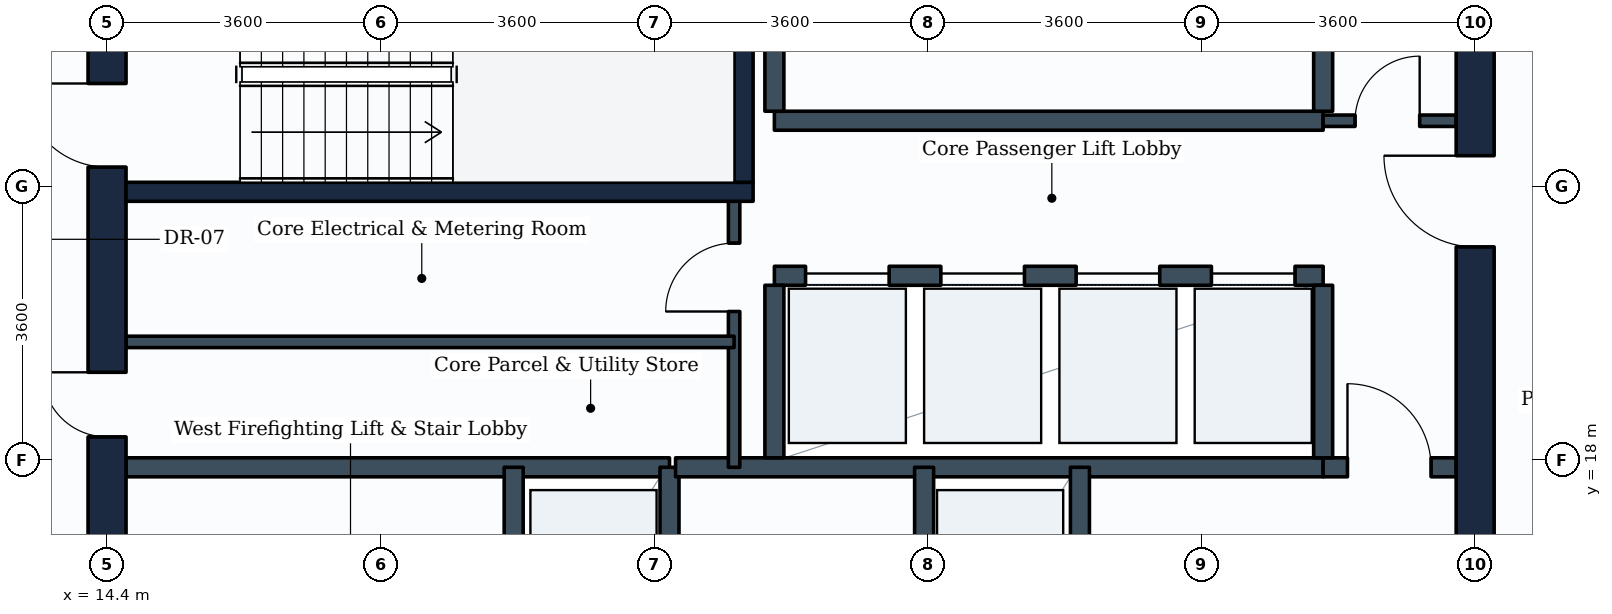
"""IFC4 building model, lengths in metres.
Left out: names, types, materials, properties, quantities, classifications, styles, units other than length and angle.
Written with IfcOpenShell. Run it as: python <this file> out.ifc"""

import sys

from ifc_helpers import new_model, si_unit, direction, frame, frame_2d, origin, place, context, subcontext, project, spatial, rectangle, extrude, element, fill, save


model = new_model("IFC4")
c1 = context("Model", 3, precision=1e-05, world=origin(), true_north=direction((0.0, 1.0)))
c2 = subcontext(c1, "Body", "Model", "MODEL_VIEW")
j1 = project(units=[si_unit("LENGTHUNIT", "METRE"), si_unit("PLANEANGLEUNIT", "RADIAN")], contexts=[c1])
p1 = place(None, origin())
s1 = spatial("IfcSite", under=j1, at=p1, CompositionType="ELEMENT")
p2 = place(p1, origin())
s2 = spatial("IfcBuilding", under=s1, at=p2, CompositionType="ELEMENT")
p3 = place(p2, frame((0.0, 0.0, 178.6)))
s3 = spatial("IfcBuildingStorey", under=s2, at=p3, CompositionType="ELEMENT", Elevation=178.6)
p4 = place(p3, frame((14.4, 10.8, 0.0), z_axis=(0.0, 0.0, 1.0), x_axis=(0.0, 1.0, 0.0)))
e1 = element("IfcWall", 1, at=p4, inside=s3, PredefinedType="SHEAR", context=c2, shape_type="SweptSolid", body=[
    extrude(rectangle(XDim=14.4, YDim=0.5, at=frame_2d((7.2, 0.0))), origin(), (0.0, 0.0, 1.0), 3.55),
])
p5 = place(p4, frame((11.05, 0.0, 0.0)))
e2 = element("IfcOpeningElement", 2, at=p5, cuts=e1, PredefinedType="OPENING", context=c2, shape_type="SweptSolid", body=[
    extrude(rectangle(XDim=1.1, YDim=2.1, at=frame_2d((0.55, 1.05))), frame((0.0, 0.26, 0.0), z_axis=(0.0, -1.0, 0.0), x_axis=(1.0, 0.0, 0.0)), (0.0, 0.0, 1.0), 0.52),
])
p6 = place(p4, frame((4.9, 0.0, 0.0)))
e3 = element("IfcOpeningElement", 3, at=p6, cuts=e1, PredefinedType="OPENING", context=c2, shape_type="SweptSolid", body=[
    extrude(rectangle(XDim=1.2, YDim=2.1, at=frame_2d((0.6, 1.05))), frame((0.0, 0.26, 0.0), z_axis=(0.0, -1.0, 0.0), x_axis=(1.0, 0.0, 0.0)), (0.0, 0.0, 1.0), 0.52),
])
p7 = place(p4, frame((7.5, 0.0, 0.0)))
e4 = element("IfcOpeningElement", 4, at=p7, cuts=e1, PredefinedType="OPENING", context=c2, shape_type="SweptSolid", body=[
    extrude(rectangle(XDim=0.85, YDim=2.1, at=frame_2d((0.425, 1.05))), frame((0.0, 0.26, 0.0), z_axis=(0.0, -1.0, 0.0), x_axis=(1.0, 0.0, 0.0)), (0.0, 0.0, 1.0), 0.52),
])
p8 = place(p3, frame((32.4, 10.8, 0.0), z_axis=(0.0, 0.0, 1.0), x_axis=(0.0, 1.0, 0.0)))
e5 = element("IfcWall", 5, at=p8, inside=s3, PredefinedType="SHEAR", context=c2, shape_type="SweptSolid", body=[
    extrude(rectangle(XDim=14.4, YDim=0.5, at=frame_2d((7.2, 0.0))), origin(), (0.0, 0.0, 1.0), 3.55),
])
p9 = place(p8, frame((4.35, 0.0, 0.0)))
e6 = element("IfcOpeningElement", 6, at=p9, cuts=e5, PredefinedType="OPENING", context=c2, shape_type="SweptSolid", body=[
    extrude(rectangle(XDim=1.2, YDim=2.1, at=frame_2d((0.6, 1.05))), frame((0.0, 0.26, 0.0), z_axis=(0.0, -1.0, 0.0), x_axis=(1.0, 0.0, 0.0)), (0.0, 0.0, 1.0), 0.52),
])
p10 = place(p8, frame((10.0, 0.0, 0.0)))
e7 = element("IfcOpeningElement", 7, at=p10, cuts=e5, PredefinedType="OPENING", context=c2, shape_type="SweptSolid", body=[
    extrude(rectangle(XDim=1.2, YDim=2.1, at=frame_2d((0.6, 1.05))), frame((0.0, 0.26, 0.0), z_axis=(0.0, -1.0, 0.0), x_axis=(1.0, 0.0, 0.0)), (0.0, 0.0, 1.0), 0.52),
])
p11 = place(p3, frame((14.65, 21.525, 0.0), z_axis=(0.0, 0.0, 1.0), x_axis=(1.0, 0.0, 0.0)))
e8 = element("IfcWall", 8, at=p11, inside=s3, PredefinedType="SHEAR", context=c2, shape_type="SweptSolid", body=[
    extrude(rectangle(XDim=8.25, YDim=0.25, at=frame_2d((4.125, 0.0))), origin(), (0.0, 0.0, 1.0), 3.55),
])
p12 = place(p3, frame((22.775, 21.65, 0.0), z_axis=(0.0, 0.0, 1.0), x_axis=(0.0, 1.0, 0.0)))
e9 = element("IfcWall", 9, at=p12, inside=s3, PredefinedType="SHEAR", context=c2, shape_type="SweptSolid", body=[
    extrude(rectangle(XDim=2.84, YDim=0.25, at=frame_2d((1.42, 0.0))), origin(), (0.0, 0.0, 1.0), 3.55),
])
p13 = place(p3, frame((14.65, 17.9, 0.0), z_axis=(0.0, 0.0, 1.0), x_axis=(1.0, 0.0, 0.0)))
e10 = element("IfcWall", 10, at=p13, inside=s3, PredefinedType="PARTITIONING", context=c2, shape_type="SweptSolid", body=[
    extrude(rectangle(XDim=7.15, YDim=0.25, at=frame_2d((3.575, 0.0))), origin(), (0.0, 0.0, 1.0), 3.535),
])
p14 = place(p3, frame((19.75, 14.84, 0.0), z_axis=(0.0, 0.0, 1.0), x_axis=(0.0, 1.0, 0.0)))
e11 = element("IfcWall", 11, at=p14, inside=s3, PredefinedType="PARTITIONING", context=c2, shape_type="SweptSolid", body=[
    extrude(rectangle(XDim=3.06, YDim=0.25, at=frame_2d((1.53, 0.0))), origin(), (0.0, 0.0, 1.0), 3.535),
])
p15 = place(p14, frame((0.98, 0.0, 0.0)))
e12 = element("IfcOpeningElement", 12, at=p15, cuts=e11, PredefinedType="OPENING", context=c2, shape_type="SweptSolid", body=[
    extrude(rectangle(XDim=1.1, YDim=2.1, at=frame_2d((0.55, 1.05))), frame((0.0, 0.135, 0.0), z_axis=(0.0, -1.0, 0.0), x_axis=(1.0, 0.0, 0.0)), (0.0, 0.0, 1.0), 0.27),
])
p16 = place(p3, frame((21.8, 14.84, 0.0), z_axis=(0.0, 0.0, 1.0), x_axis=(0.0, 1.0, 0.0)))
e13 = element("IfcWall", 13, at=p16, inside=s3, PredefinedType="PARTITIONING", context=c2, shape_type="SweptSolid", body=[
    extrude(rectangle(XDim=3.06, YDim=0.25, at=frame_2d((1.53, 0.0))), origin(), (0.0, 0.0, 1.0), 3.535),
])
p17 = place(p3, frame((21.88, 17.9, 0.0), z_axis=(0.0, 0.0, 1.0), x_axis=(1.0, 0.0, 0.0)))
e14 = element("IfcWall", 14, at=p17, inside=s3, PredefinedType="PARTITIONING", context=c2, shape_type="SweptSolid", body=[
    extrude(rectangle(XDim=8.52, YDim=0.25, at=frame_2d((4.26, 0.0))), origin(), (0.0, 0.0, 1.0), 3.535),
])
p18 = place(p3, frame((30.4, 17.9, 0.0), z_axis=(0.0, 0.0, 1.0), x_axis=(1.0, 0.0, 0.0)))
e15 = element("IfcWall", 15, at=p18, inside=s3, PredefinedType="PARTITIONING", context=c2, shape_type="SweptSolid", body=[
    extrude(rectangle(XDim=1.75, YDim=0.25, at=frame_2d((0.875, 0.0))), origin(), (0.0, 0.0, 1.0), 3.535),
])
p19 = place(p18, frame((0.32, 0.0, 0.0)))
e16 = element("IfcOpeningElement", 16, at=p19, cuts=e15, PredefinedType="OPENING", context=c2, shape_type="SweptSolid", body=[
    extrude(rectangle(XDim=1.1, YDim=2.1, at=frame_2d((0.55, 1.05))), frame((0.0, 0.135, 0.0), z_axis=(0.0, -1.0, 0.0), x_axis=(1.0, 0.0, 0.0)), (0.0, 0.0, 1.0), 0.27),
])
p20 = place(p3, frame((25.15, 14.84, 0.0), z_axis=(0.0, 0.0, 1.0), x_axis=(0.0, 1.0, 0.0)))
e17 = element("IfcWall", 17, at=p20, inside=s3, PredefinedType="PARTITIONING", context=c2, shape_type="SweptSolid", body=[
    extrude(rectangle(XDim=3.06, YDim=0.25, at=frame_2d((1.53, 0.0))), origin(), (0.0, 0.0, 1.0), 3.535),
])
p21 = place(p3, frame((27.2, 14.84, 0.0), z_axis=(0.0, 0.0, 1.0), x_axis=(0.0, 1.0, 0.0)))
e18 = element("IfcWall", 18, at=p21, inside=s3, PredefinedType="PARTITIONING", context=c2, shape_type="SweptSolid", body=[
    extrude(rectangle(XDim=3.06, YDim=0.25, at=frame_2d((1.53, 0.0))), origin(), (0.0, 0.0, 1.0), 3.535),
])
p22 = place(p21, frame((0.98, 0.0, 0.0)))
e19 = element("IfcOpeningElement", 19, at=p22, cuts=e18, PredefinedType="OPENING", context=c2, shape_type="SweptSolid", body=[
    extrude(rectangle(XDim=1.1, YDim=2.1, at=frame_2d((0.55, 1.05))), frame((0.0, 0.135, 0.0), z_axis=(0.0, -1.0, 0.0), x_axis=(1.0, 0.0, 0.0)), (0.0, 0.0, 1.0), 0.27),
])
p23 = place(p3, frame((23.18, 20.42, 0.0), z_axis=(0.0, 0.0, 1.0), x_axis=(1.0, 0.0, 0.0)))
e20 = element("IfcWall", 20, at=p23, inside=s3, PredefinedType="PARTITIONING", context=c2, shape_type="SweptSolid", body=[
    extrude(rectangle(XDim=7.22, YDim=0.25, at=frame_2d((3.61, 0.0))), origin(), (0.0, 0.0, 1.0), 3.535),
])
p24 = place(p23, frame((0.41, 0.0, 0.0)))
e21 = element("IfcOpeningElement", 21, at=p24, cuts=e20, PredefinedType="OPENING", context=c2, shape_type="SweptSolid", body=[
    extrude(rectangle(XDim=1.1, YDim=2.1, at=frame_2d((0.55, 1.05))), frame((0.0, 0.135, 0.0), z_axis=(0.0, -1.0, 0.0), x_axis=(1.0, 0.0, 0.0)), (0.0, 0.0, 1.0), 0.27),
])
p25 = place(p23, frame((2.19, 0.0, 0.0)))
e22 = element("IfcOpeningElement", 22, at=p25, cuts=e20, PredefinedType="OPENING", context=c2, shape_type="SweptSolid", body=[
    extrude(rectangle(XDim=1.1, YDim=2.1, at=frame_2d((0.55, 1.05))), frame((0.0, 0.135, 0.0), z_axis=(0.0, -1.0, 0.0), x_axis=(1.0, 0.0, 0.0)), (0.0, 0.0, 1.0), 0.27),
])
p26 = place(p23, frame((3.97, 0.0, 0.0)))
e23 = element("IfcOpeningElement", 23, at=p26, cuts=e20, PredefinedType="OPENING", context=c2, shape_type="SweptSolid", body=[
    extrude(rectangle(XDim=1.1, YDim=2.1, at=frame_2d((0.55, 1.05))), frame((0.0, 0.135, 0.0), z_axis=(0.0, -1.0, 0.0), x_axis=(1.0, 0.0, 0.0)), (0.0, 0.0, 1.0), 0.27),
])
p27 = place(p23, frame((5.75, 0.0, 0.0)))
e24 = element("IfcOpeningElement", 24, at=p27, cuts=e20, PredefinedType="OPENING", context=c2, shape_type="SweptSolid", body=[
    extrude(rectangle(XDim=1.1, YDim=2.1, at=frame_2d((0.55, 1.05))), frame((0.0, 0.135, 0.0), z_axis=(0.0, -1.0, 0.0), x_axis=(1.0, 0.0, 0.0)), (0.0, 0.0, 1.0), 0.27),
])
for number, where, z_axis, x_axis in (
    (25, (23.18, 18.025, 0.0), (0.0, 0.0, 1.0), (0.0, 1.0, 0.0)),
    (26, (30.4, 18.025, 0.0), (0.0, 0.0, 1.0), (0.0, 1.0, 0.0)),
):
    element("IfcWall", number, at=place(p3, frame(where, z_axis=z_axis, x_axis=x_axis)), inside=s3, PredefinedType="PARTITIONING", context=c2, shape_type="SweptSolid", body=[
        extrude(rectangle(XDim=2.27, YDim=0.25, at=frame_2d((1.135, 0.0))), origin(), (0.0, 0.0, 1.0), 3.535),
    ])
p28 = place(p3, frame((23.18, 22.46, 0.0), z_axis=(0.0, 0.0, 1.0), x_axis=(1.0, 0.0, 0.0)))
e27 = element("IfcWall", 27, at=p28, inside=s3, PredefinedType="PARTITIONING", context=c2, shape_type="SweptSolid", body=[
    extrude(rectangle(XDim=7.22, YDim=0.25, at=frame_2d((3.61, 0.0))), origin(), (0.0, 0.0, 1.0), 3.535),
])
for number, where, z_axis, x_axis in (
    (28, (23.18, 22.585, 0.0), (0.0, 0.0, 1.0), (0.0, 1.0, 0.0)),
    (29, (30.4, 22.585, 0.0), (0.0, 0.0, 1.0), (0.0, 1.0, 0.0)),
):
    element("IfcWall", number, at=place(p3, frame(where, z_axis=z_axis, x_axis=x_axis)), inside=s3, PredefinedType="PARTITIONING", context=c2, shape_type="SweptSolid", body=[
        extrude(rectangle(XDim=2.315, YDim=0.25, at=frame_2d((1.157, 0.0))), origin(), (0.0, 0.0, 1.0), 3.535),
    ])
p29 = place(p3, frame((22.65, 17.9, 0.0), z_axis=(0.0, 0.0, 1.0), x_axis=(0.0, 1.0, 0.0)))
e30 = element("IfcWall", 30, at=p29, inside=s3, PredefinedType="PARTITIONING", context=c2, shape_type="SweptSolid", body=[
    extrude(rectangle(XDim=3.625, YDim=0.15, at=frame_2d((1.812, 0.0))), origin(), (0.0, 0.0, 1.0), 3.535),
])
p30 = place(p29, frame((2.05, 0.0, 0.0)))
e31 = element("IfcOpeningElement", 31, at=p30, cuts=e30, PredefinedType="OPENING", context=c2, shape_type="SweptSolid", body=[
    extrude(rectangle(XDim=0.9, YDim=2.1, at=frame_2d((0.45, 1.05))), frame((0.0, 0.085, 0.0), z_axis=(0.0, -1.0, 0.0), x_axis=(1.0, 0.0, 0.0)), (0.0, 0.0, 1.0), 0.17),
])
p31 = place(p3, frame((14.65, 19.55, 0.0), z_axis=(0.0, 0.0, 1.0), x_axis=(1.0, 0.0, 0.0)))
e32 = element("IfcWall", 32, at=p31, inside=s3, PredefinedType="PARTITIONING", context=c2, shape_type="SweptSolid", body=[
    extrude(rectangle(XDim=8.0, YDim=0.15, at=frame_2d((4.0, 0.0))), origin(), (0.0, 0.0, 1.0), 3.535),
])
p32 = place(p3, frame((30.4, 22.46, 0.0), z_axis=(0.0, 0.0, 1.0), x_axis=(1.0, 0.0, 0.0)))
e33 = element("IfcWall", 33, at=p32, inside=s3, PredefinedType="PARTITIONING", context=c2, shape_type="SweptSolid", body=[
    extrude(rectangle(XDim=1.75, YDim=0.15, at=frame_2d((0.875, 0.0))), origin(), (0.0, 0.0, 1.0), 3.535),
])
p33 = place(p32, frame((0.42, 0.0, 0.0)))
e34 = element("IfcOpeningElement", 34, at=p33, cuts=e33, PredefinedType="OPENING", context=c2, shape_type="SweptSolid", body=[
    extrude(rectangle(XDim=0.85, YDim=2.1, at=frame_2d((0.425, 1.05))), frame((0.0, 0.085, 0.0), z_axis=(0.0, -1.0, 0.0), x_axis=(1.0, 0.0, 0.0)), (0.0, 0.0, 1.0), 0.17),
])
p34 = place(p5, origin())
e35 = element("IfcDoor", 35, at=p34, inside=s3, OperationType="SINGLE_SWING_RIGHT", PredefinedType="DOOR", context=c2, shape_type="SweptSolid", body=[
    extrude(rectangle(XDim=1.1, YDim=2.1, at=frame_2d((0.55, 1.05))), frame((0.0, 0.025, 0.0), z_axis=(0.0, -1.0, 0.0), x_axis=(1.0, 0.0, 0.0)), (0.0, 0.0, 1.0), 0.05),
])
fill(e2, e35)
p35 = place(p19, origin())
e36 = element("IfcDoor", 36, at=p35, inside=s3, OperationType="SINGLE_SWING_LEFT", PredefinedType="DOOR", context=c2, shape_type="SweptSolid", body=[
    extrude(rectangle(XDim=1.1, YDim=2.1, at=frame_2d((0.55, 1.05))), frame((0.0, 0.025, 0.0), z_axis=(0.0, -1.0, 0.0), x_axis=(1.0, 0.0, 0.0)), (0.0, 0.0, 1.0), 0.05),
])
fill(e16, e36)
p36 = place(p24, origin())
e37 = element("IfcDoor", 37, at=p36, inside=s3, OperationType="SLIDING_TO_LEFT", PredefinedType="DOOR", context=c2, shape_type="SweptSolid", body=[
    extrude(rectangle(XDim=1.1, YDim=2.1, at=frame_2d((0.55, 1.05))), frame((0.0, 0.025, 0.0), z_axis=(0.0, -1.0, 0.0), x_axis=(1.0, 0.0, 0.0)), (0.0, 0.0, 1.0), 0.05),
])
fill(e21, e37)
p37 = place(p25, origin())
e38 = element("IfcDoor", 38, at=p37, inside=s3, OperationType="SLIDING_TO_LEFT", PredefinedType="DOOR", context=c2, shape_type="SweptSolid", body=[
    extrude(rectangle(XDim=1.1, YDim=2.1, at=frame_2d((0.55, 1.05))), frame((0.0, 0.025, 0.0), z_axis=(0.0, -1.0, 0.0), x_axis=(1.0, 0.0, 0.0)), (0.0, 0.0, 1.0), 0.05),
])
fill(e22, e38)
p38 = place(p26, origin())
e39 = element("IfcDoor", 39, at=p38, inside=s3, OperationType="SLIDING_TO_LEFT", PredefinedType="DOOR", context=c2, shape_type="SweptSolid", body=[
    extrude(rectangle(XDim=1.1, YDim=2.1, at=frame_2d((0.55, 1.05))), frame((0.0, 0.025, 0.0), z_axis=(0.0, -1.0, 0.0), x_axis=(1.0, 0.0, 0.0)), (0.0, 0.0, 1.0), 0.05),
])
fill(e23, e39)
p39 = place(p27, origin())
e40 = element("IfcDoor", 40, at=p39, inside=s3, OperationType="SLIDING_TO_LEFT", PredefinedType="DOOR", context=c2, shape_type="SweptSolid", body=[
    extrude(rectangle(XDim=1.1, YDim=2.1, at=frame_2d((0.55, 1.05))), frame((0.0, 0.025, 0.0), z_axis=(0.0, -1.0, 0.0), x_axis=(1.0, 0.0, 0.0)), (0.0, 0.0, 1.0), 0.05),
])
fill(e24, e40)
p40 = place(p10, origin())
e41 = element("IfcDoor", 41, at=p40, inside=s3, OperationType="SINGLE_SWING_RIGHT", PredefinedType="DOOR", context=c2, shape_type="SweptSolid", body=[
    extrude(rectangle(XDim=1.2, YDim=2.1, at=frame_2d((0.6, 1.05))), frame((0.0, 0.025, 0.0), z_axis=(0.0, -1.0, 0.0), x_axis=(1.0, 0.0, 0.0)), (0.0, 0.0, 1.0), 0.05),
])
fill(e7, e41)
p41 = place(p7, origin())
e42 = element("IfcDoor", 42, at=p41, inside=s3, OperationType="SINGLE_SWING_RIGHT", PredefinedType="DOOR", context=c2, shape_type="SweptSolid", body=[
    extrude(rectangle(XDim=0.85, YDim=2.1, at=frame_2d((0.425, 1.05))), frame((0.0, 0.025, 0.0), z_axis=(0.0, -1.0, 0.0), x_axis=(1.0, 0.0, 0.0)), (0.0, 0.0, 1.0), 0.05),
])
fill(e4, e42)
p42 = place(p30, origin())
e43 = element("IfcDoor", 43, at=p42, inside=s3, OperationType="SINGLE_SWING_LEFT", PredefinedType="DOOR", context=c2, shape_type="SweptSolid", body=[
    extrude(rectangle(XDim=0.9, YDim=2.1, at=frame_2d((0.45, 1.05))), frame((0.0, 0.025, 0.0), z_axis=(0.0, -1.0, 0.0), x_axis=(1.0, 0.0, 0.0)), (0.0, 0.0, 1.0), 0.05),
])
fill(e31, e43)
p43 = place(p33, origin())
e44 = element("IfcDoor", 44, at=p43, inside=s3, OperationType="SINGLE_SWING_RIGHT", PredefinedType="DOOR", context=c2, shape_type="SweptSolid", body=[
    extrude(rectangle(XDim=0.85, YDim=2.1, at=frame_2d((0.425, 1.05))), frame((0.0, 0.025, 0.0), z_axis=(0.0, -1.0, 0.0), x_axis=(1.0, 0.0, 0.0)), (0.0, 0.0, 1.0), 0.05),
])
fill(e34, e44)
save(model, sys.argv[1])
